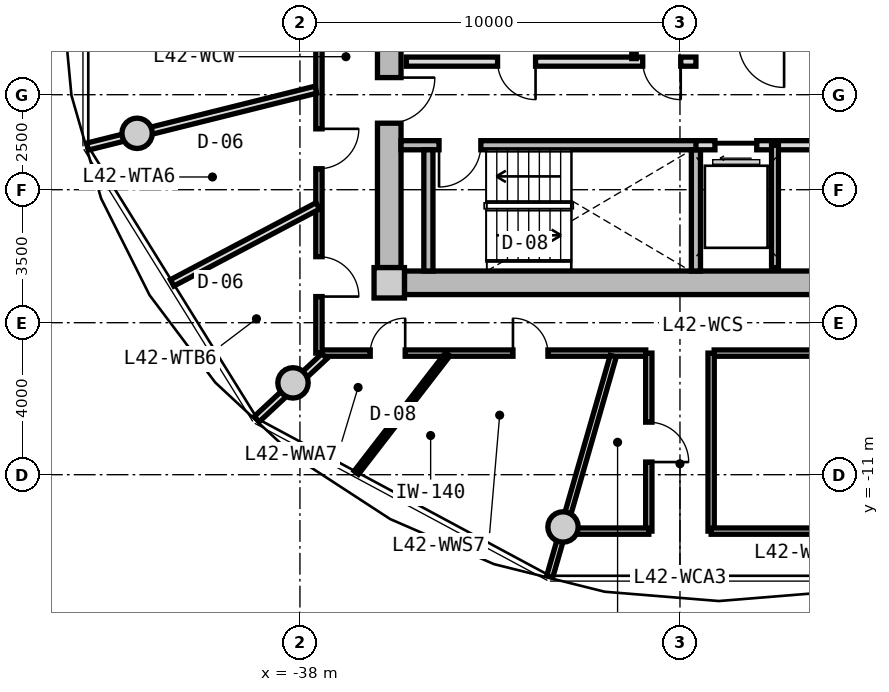
"""IFC4 building model, lengths in metres.
Left out: names, types, materials, properties, quantities, classifications, styles, units other than length and angle.
Written with IfcOpenShell. Run it as: python <this file> out.ifc"""

import sys

from ifc_helpers import new_model, si_unit, direction, frame, frame_2d, origin, origin_2d, place, context, subcontext, project, spatial, rectangle, circle, extrude, source, transform, mapped, element, fill, save


model = new_model("IFC4")
c1 = context("Model", 3, precision=1e-05, world=origin(), true_north=direction((0.0, 1.0)))
c2 = subcontext(c1, "Body", "Model", "MODEL_VIEW")
j1 = project(units=[si_unit("LENGTHUNIT", "METRE"), si_unit("PLANEANGLEUNIT", "RADIAN")], contexts=[c1])
p1 = place(None, origin())
s1 = spatial("IfcSite", under=j1, at=p1, CompositionType="ELEMENT")
p2 = place(p1, origin())
s2 = spatial("IfcBuilding", under=s1, at=p2, CompositionType="ELEMENT")
p3 = place(p2, frame((0.0, 0.0, 137.35)))
s3 = spatial("IfcBuildingStorey", under=s2, at=p3, CompositionType="ELEMENT", Elevation=137.35)
m1 = source(origin(), c2, "Body", "SweptSolid", [
    extrude(rectangle(XDim=0.8, YDim=0.8, at=origin_2d()), origin(), (0.0, 0.0, 1.0), 3.05),
])
p4 = place(p3, frame((-35.65, -5.95, 0.0), z_axis=(0.0, 0.0, 1.0), x_axis=(1.0, 0.0, 0.0)))
e1 = element("IfcColumn", 1, at=p4, inside=s3, PredefinedType="COLUMN", context=c2, shape_type="MappedRepresentation", body=[
    mapped(m1, transform((0.0, 0.0, 0.0), x_axis=(1.0, 0.0, 0.0), y_axis=(0.0, 1.0, 0.0), z_axis=(0.0, 0.0, 1.0), scale=1.0)),
])
m2 = source(origin(), c2, "Body", "SweptSolid", [
    extrude(rectangle(XDim=14.5, YDim=0.62, at=frame_2d((7.25, 0.0))), origin(), (0.0, 0.0, 1.0), 2.81),
])
p5 = place(p3, frame((-20.75, -5.95, 0.0), z_axis=(0.0, 0.0, 1.0), x_axis=(-1.0, 0.0, 0.0)))
e2 = element("IfcWall", 2, at=p5, inside=s3, PredefinedType="SHEAR", context=c2, shape_type="MappedRepresentation", body=[
    mapped(m2, transform((0.0, 0.0, 0.0), x_axis=(1.0, 0.0, 0.0), y_axis=(0.0, 1.0, 0.0), z_axis=(0.0, 0.0, 1.0), scale=1.0)),
])
m3 = source(origin(), c2, "Body", "SweptSolid", [
    extrude(rectangle(XDim=11.1, YDim=0.62, at=frame_2d((5.55, 0.0))), origin(), (0.0, 0.0, 1.0), 2.81),
])
p6 = place(p3, frame((-35.65, -5.55, 0.0), z_axis=(0.0, 0.0, 1.0), x_axis=(0.0, 1.0, 0.0)))
e3 = element("IfcWall", 3, at=p6, inside=s3, PredefinedType="SHEAR", context=c2, shape_type="MappedRepresentation", body=[
    mapped(m3, transform((0.0, 0.0, 0.0), x_axis=(1.0, 0.0, 0.0), y_axis=(0.0, 1.0, 0.0), z_axis=(0.0, 0.0, 1.0), scale=1.0)),
])
p7 = place(p6, frame((3.8, 0.0, 0.0)))
e4 = element("IfcOpeningElement", 4, at=p7, cuts=e3, PredefinedType="OPENING", context=c2, shape_type="SweptSolid", body=[
    extrude(rectangle(XDim=1.2, YDim=2.15, at=frame_2d((0.6, 1.075))), frame((0.0, 0.32, 0.0), z_axis=(0.0, -1.0, 0.0), x_axis=(1.0, 0.0, 0.0)), (0.0, 0.0, 1.0), 0.64),
])
m4 = source(origin(), c2, "Body", "SweptSolid", [
    extrude(circle(Radius=0.4, at=origin_2d()), origin(), (0.0, 0.0, 1.0), 3.05),
])
for number, where, z_axis, x_axis in (
    (5, (-42.285, -2.016, 0.0), (0.0, 0.0, 1.0), (1.0, 0.0, 0.0)),
    (6, (-38.183, -8.584, 0.0), (0.0, 0.0, 1.0), (1.0, 0.0, 0.0)),
    (7, (-31.077, -12.375, 0.0), (0.0, 0.0, 1.0), (1.0, 0.0, 0.0)),
):
    element("IfcColumn", number, at=place(p3, frame(where, z_axis=z_axis, x_axis=x_axis)), inside=s3, PredefinedType="COLUMN", context=c2, shape_type="MappedRepresentation", body=[
        mapped(m4, transform((0.0, 0.0, 0.0), x_axis=(1.0, 0.0, 0.0), y_axis=(0.0, 1.0, 0.0), z_axis=(0.0, 0.0, 1.0), scale=1.0)),
    ])
m5 = source(origin(), c2, "Body", "SweptSolid", [
    extrude(rectangle(XDim=7.88, YDim=0.24, at=frame_2d((3.94, 0.0))), origin(), (0.0, 0.0, 1.0), 2.81),
])
p8 = place(p3, frame((-35.34, -2.33, 0.0), z_axis=(0.0, 0.0, 1.0), x_axis=(1.0, 0.0, 0.0)))
e8 = element("IfcWall", 8, at=p8, inside=s3, PredefinedType="PARTITIONING", context=c2, shape_type="MappedRepresentation", body=[
    mapped(m5, transform((0.0, 0.0, 0.0), x_axis=(1.0, 0.0, 0.0), y_axis=(0.0, 1.0, 0.0), z_axis=(0.0, 0.0, 1.0), scale=1.0)),
])
p9 = place(p8, frame((1.0, 0.0, 0.0)))
e9 = element("IfcOpeningElement", 9, at=p9, cuts=e8, PredefinedType="OPENING", context=c2, shape_type="SweptSolid", body=[
    extrude(rectangle(XDim=1.1, YDim=2.15, at=frame_2d((0.55, 1.075))), frame((0.0, 0.13, 0.0), z_axis=(0.0, -1.0, 0.0), x_axis=(1.0, 0.0, 0.0)), (0.0, 0.0, 1.0), 0.26),
])
m6 = source(origin(), c2, "Body", "SweptSolid", [
    extrude(rectangle(XDim=3.19, YDim=0.24, at=frame_2d((1.595, 0.0))), origin(), (0.0, 0.0, 1.0), 2.81),
])
for number, where, z_axis, x_axis in (
    (10, (-34.62, -5.64, 0.0), (0.0, 0.0, 1.0), (0.0, 1.0, 0.0)),
    (11, (-27.58, -5.64, 0.0), (0.0, 0.0, 1.0), (0.0, 1.0, 0.0)),
):
    element("IfcWall", number, at=place(p3, frame(where, z_axis=z_axis, x_axis=x_axis)), inside=s3, PredefinedType="PARTITIONING", context=c2, shape_type="MappedRepresentation", body=[
        mapped(m6, transform((0.0, 0.0, 0.0), x_axis=(1.0, 0.0, 0.0), y_axis=(0.0, 1.0, 0.0), z_axis=(0.0, 0.0, 1.0), scale=1.0)),
    ])
m7 = source(origin(), c2, "Body", "SweptSolid", [
    extrude(rectangle(XDim=7.62, YDim=0.24, at=frame_2d((3.81, 0.0))), origin(), (0.0, 0.0, 1.0), 2.795),
])
p10 = place(p3, frame((-35.2, -0.13, 0.0), z_axis=(0.0, 0.0, 1.0), x_axis=(1.0, 0.0, 0.0)))
e12 = element("IfcWall", 12, at=p10, inside=s3, PredefinedType="PARTITIONING", context=c2, shape_type="MappedRepresentation", body=[
    mapped(m7, transform((0.0, 0.0, 0.0), x_axis=(1.0, 0.0, 0.0), y_axis=(0.0, 1.0, 0.0), z_axis=(0.0, 0.0, 1.0), scale=1.0)),
])
p11 = place(p10, frame((6.22, 0.0, 0.0)))
e13 = element("IfcOpeningElement", 13, at=p11, cuts=e12, PredefinedType="OPENING", context=c2, shape_type="SweptSolid", body=[
    extrude(rectangle(XDim=1.0, YDim=2.1, at=frame_2d((0.5, 1.05))), frame((0.0, 0.13, 0.0), z_axis=(0.0, -1.0, 0.0), x_axis=(1.0, 0.0, 0.0)), (0.0, 0.0, 1.0), 0.26),
])
p12 = place(p10, frame((2.4, 0.0, 0.0)))
e14 = element("IfcOpeningElement", 14, at=p12, cuts=e12, PredefinedType="OPENING", context=c2, shape_type="SweptSolid", body=[
    extrude(rectangle(XDim=1.0, YDim=2.1, at=frame_2d((0.5, 1.05))), frame((0.0, 0.13, 0.0), z_axis=(0.0, -1.0, 0.0), x_axis=(1.0, 0.0, 0.0)), (0.0, 0.0, 1.0), 0.26),
])
m8 = source(origin(), c2, "Body", "SweptSolid", [
    extrude(rectangle(XDim=2.33, YDim=0.115, at=frame_2d((1.165, 0.0))), origin(), (0.0, 0.0, 1.0), 2.795),
])
p13 = place(p3, frame((-29.21, -0.05, 0.0), z_axis=(0.0, 0.0, 1.0), x_axis=(0.0, 1.0, 0.0)))
e15 = element("IfcWall", 15, at=p13, inside=s3, PredefinedType="PARTITIONING", context=c2, shape_type="MappedRepresentation", body=[
    mapped(m8, transform((0.0, 0.0, 0.0), x_axis=(1.0, 0.0, 0.0), y_axis=(0.0, 1.0, 0.0), z_axis=(0.0, 0.0, 1.0), scale=1.0)),
])
m9 = source(origin(), c2, "Body", "SweptSolid", [
    extrude(rectangle(XDim=4.13, YDim=0.24, at=frame_2d((2.065, 0.0))), origin(), (0.0, 0.0, 1.0), 2.795),
])
p14 = place(p3, frame((-27.58, -2.33, 0.0), z_axis=(0.0, 0.0, 1.0), x_axis=(1.0, 0.0, 0.0)))
e16 = element("IfcWall", 16, at=p14, inside=s3, PredefinedType="PARTITIONING", context=c2, shape_type="MappedRepresentation", body=[
    mapped(m9, transform((0.0, 0.0, 0.0), x_axis=(1.0, 0.0, 0.0), y_axis=(0.0, 1.0, 0.0), z_axis=(0.0, 0.0, 1.0), scale=1.0)),
])
p15 = place(p14, frame((0.5, 0.0, 0.0)))
e17 = element("IfcOpeningElement", 17, at=p15, cuts=e16, PredefinedType="OPENING", context=c2, shape_type="SweptSolid", body=[
    extrude(rectangle(XDim=1.1, YDim=2.2, at=frame_2d((0.55, 1.1))), frame((0.0, 0.13, 0.0), z_axis=(0.0, -1.0, 0.0), x_axis=(1.0, 0.0, 0.0)), (0.0, 0.0, 1.0), 0.26),
])
m10 = source(origin(), c2, "Body", "SweptSolid", [
    extrude(rectangle(XDim=3.22, YDim=0.18, at=frame_2d((1.61, 0.0))), origin(), (0.0, 0.0, 1.0), 2.795),
])
p16 = place(p3, frame((-25.5, -5.55, 0.0), z_axis=(0.0, 0.0, 1.0), x_axis=(0.0, 1.0, 0.0)))
e18 = element("IfcWall", 18, at=p16, inside=s3, PredefinedType="PARTITIONING", context=c2, shape_type="MappedRepresentation", body=[
    mapped(m10, transform((0.0, 0.0, 0.0), x_axis=(1.0, 0.0, 0.0), y_axis=(0.0, 1.0, 0.0), z_axis=(0.0, 0.0, 1.0), scale=1.0)),
])
m11 = source(origin(), c2, "Body", "SweptSolid", [
    extrude(rectangle(XDim=8.6, YDim=0.165, at=frame_2d((4.3, 0.0))), origin(), (0.0, 0.0, 1.0), 2.795),
])
p17 = place(p3, frame((-18.5, -7.8, 0.0), z_axis=(0.0, 0.0, 1.0), x_axis=(-1.0, 0.0, 0.0)))
e19 = element("IfcWall", 19, at=p17, inside=s3, PredefinedType="PARTITIONING", context=c2, shape_type="MappedRepresentation", body=[
    mapped(m11, transform((0.0, 0.0, 0.0), x_axis=(1.0, 0.0, 0.0), y_axis=(0.0, 1.0, 0.0), z_axis=(0.0, 0.0, 1.0), scale=1.0)),
])
p18 = place(p17, frame((3.775, 0.0, 0.0)))
e20 = element("IfcOpeningElement", 20, at=p18, cuts=e19, PredefinedType="OPENING", context=c2, shape_type="SweptSolid", body=[
    extrude(rectangle(XDim=1.05, YDim=2.15, at=frame_2d((0.525, 1.075))), frame((0.0, 0.093, 0.0), z_axis=(0.0, -1.0, 0.0), x_axis=(1.0, 0.0, 0.0)), (0.0, 0.0, 1.0), 0.185),
])
p19 = place(p3, frame((-28.9, -7.8, 0.0), z_axis=(0.0, 0.0, 1.0), x_axis=(-1.0, 0.0, 0.0)))
e21 = element("IfcWall", 21, at=p19, inside=s3, PredefinedType="PARTITIONING", context=c2, shape_type="MappedRepresentation", body=[
    mapped(m11, transform((0.0, 0.0, 0.0), x_axis=(1.0, 0.0, 0.0), y_axis=(0.0, 1.0, 0.0), z_axis=(0.0, 0.0, 1.0), scale=1.0)),
])
p20 = place(p19, frame((6.33, 0.0, 0.0)))
e22 = element("IfcOpeningElement", 22, at=p20, cuts=e21, PredefinedType="OPENING", context=c2, shape_type="SweptSolid", body=[
    extrude(rectangle(XDim=0.92, YDim=2.1, at=frame_2d((0.46, 1.05))), frame((0.0, 0.093, 0.0), z_axis=(0.0, -1.0, 0.0), x_axis=(1.0, 0.0, 0.0)), (0.0, 0.0, 1.0), 0.185),
])
p21 = place(p19, frame((2.575, 0.0, 0.0)))
e23 = element("IfcOpeningElement", 23, at=p21, cuts=e21, PredefinedType="OPENING", context=c2, shape_type="SweptSolid", body=[
    extrude(rectangle(XDim=0.92, YDim=2.1, at=frame_2d((0.46, 1.05))), frame((0.0, 0.093, 0.0), z_axis=(0.0, -1.0, 0.0), x_axis=(1.0, 0.0, 0.0)), (0.0, 0.0, 1.0), 0.185),
])
m12 = source(origin(), c2, "Body", "SweptSolid", [
    extrude(rectangle(XDim=15.6, YDim=0.165, at=frame_2d((7.8, 0.0))), origin(), (0.0, 0.0, 1.0), 2.795),
])
p22 = place(p3, frame((-37.5, -7.8, 0.0), z_axis=(0.0, 0.0, 1.0), x_axis=(0.0, 1.0, 0.0)))
e24 = element("IfcWall", 24, at=p22, inside=s3, PredefinedType="PARTITIONING", context=c2, shape_type="MappedRepresentation", body=[
    mapped(m12, transform((0.0, 0.0, 0.0), x_axis=(1.0, 0.0, 0.0), y_axis=(0.0, 1.0, 0.0), z_axis=(0.0, 0.0, 1.0), scale=1.0)),
])
p23 = place(p22, frame((8.95, 0.0, 0.0)))
e25 = element("IfcOpeningElement", 25, at=p23, cuts=e24, PredefinedType="OPENING", context=c2, shape_type="SweptSolid", body=[
    extrude(rectangle(XDim=1.25, YDim=2.2, at=frame_2d((0.625, 1.1))), frame((0.0, 0.093, 0.0), z_axis=(0.0, -1.0, 0.0), x_axis=(1.0, 0.0, 0.0)), (0.0, 0.0, 1.0), 0.185),
])
p24 = place(p22, frame((4.851, 0.0, 0.0)))
e26 = element("IfcOpeningElement", 26, at=p24, cuts=e24, PredefinedType="OPENING", context=c2, shape_type="SweptSolid", body=[
    extrude(rectangle(XDim=1.05, YDim=2.15, at=frame_2d((0.525, 1.075))), frame((0.0, 0.093, 0.0), z_axis=(0.0, -1.0, 0.0), x_axis=(1.0, 0.0, 0.0)), (0.0, 0.0, 1.0), 0.185),
])
p25 = place(p22, frame((1.488, 0.0, 0.0)))
e27 = element("IfcOpeningElement", 27, at=p25, cuts=e24, PredefinedType="OPENING", context=c2, shape_type="SweptSolid", body=[
    extrude(rectangle(XDim=1.05, YDim=2.15, at=frame_2d((0.525, 1.075))), frame((0.0, 0.093, 0.0), z_axis=(0.0, -1.0, 0.0), x_axis=(1.0, 0.0, 0.0)), (0.0, 0.0, 1.0), 0.185),
])
m13 = source(origin(), c2, "Body", "SweptSolid", [
    extrude(rectangle(XDim=6.035, YDim=0.165, at=frame_2d((3.018, 0.0))), origin(), (0.0, 0.0, 1.0), 2.345),
])
p26 = place(p3, frame((-29.756, -7.88, 0.0), z_axis=(0.0, 0.0, 1.0), x_axis=(-0.276809454862, -0.960924828329, 0.0)))
e28 = element("IfcWall", 28, at=p26, inside=s3, PredefinedType="PARTITIONING", context=c2, shape_type="MappedRepresentation", body=[
    mapped(m13, transform((0.0, 0.0, 0.0), x_axis=(1.0, 0.0, 0.0), y_axis=(0.0, 1.0, 0.0), z_axis=(0.0, 0.0, 1.0), scale=1.0)),
])
m14 = source(origin(), c2, "Body", "SweptSolid", [
    extrude(rectangle(XDim=4.685, YDim=0.165, at=frame_2d((2.342, 0.0))), origin(), (0.0, 0.0, 1.0), 2.795),
])
p27 = place(p3, frame((-28.82, -12.485, 0.0), z_axis=(0.0, 0.0, 1.0), x_axis=(0.0, 1.0, 0.0)))
e29 = element("IfcWall", 29, at=p27, inside=s3, PredefinedType="PARTITIONING", context=c2, shape_type="MappedRepresentation", body=[
    mapped(m14, transform((0.0, 0.0, 0.0), x_axis=(1.0, 0.0, 0.0), y_axis=(0.0, 1.0, 0.0), z_axis=(0.0, 0.0, 1.0), scale=1.0)),
])
p28 = place(p27, frame((1.817, 0.0, 0.0)))
e30 = element("IfcOpeningElement", 30, at=p28, cuts=e29, PredefinedType="OPENING", context=c2, shape_type="SweptSolid", body=[
    extrude(rectangle(XDim=1.05, YDim=2.15, at=frame_2d((0.525, 1.075))), frame((0.0, 0.093, 0.0), z_axis=(0.0, -1.0, 0.0), x_axis=(1.0, 0.0, 0.0)), (0.0, 0.0, 1.0), 0.185),
])
m15 = source(origin(), c2, "Body", "SweptSolid", [
    extrude(rectangle(XDim=2.419, YDim=0.165, at=frame_2d((1.209, 0.0))), origin(), (0.0, 0.0, 1.0), 2.345),
])
p29 = place(p3, frame((-31.239, -12.485, 0.0), z_axis=(0.0, 0.0, 1.0), x_axis=(1.0, 0.0, 0.0)))
e31 = element("IfcWall", 31, at=p29, inside=s3, PredefinedType="PARTITIONING", context=c2, shape_type="MappedRepresentation", body=[
    mapped(m15, transform((0.0, 0.0, 0.0), x_axis=(1.0, 0.0, 0.0), y_axis=(0.0, 1.0, 0.0), z_axis=(0.0, 0.0, 1.0), scale=1.0)),
])
p30 = place(p3, frame((-27.18, -12.485, 0.0), z_axis=(0.0, 0.0, 1.0), x_axis=(0.0, 1.0, 0.0)))
e32 = element("IfcWall", 32, at=p30, inside=s3, PredefinedType="PARTITIONING", context=c2, shape_type="MappedRepresentation", body=[
    mapped(m14, transform((0.0, 0.0, 0.0), x_axis=(1.0, 0.0, 0.0), y_axis=(0.0, 1.0, 0.0), z_axis=(0.0, 0.0, 1.0), scale=1.0)),
])
m16 = source(origin(), c2, "Body", "SweptSolid", [
    extrude(rectangle(XDim=7.139, YDim=0.165, at=frame_2d((3.569, 0.0))), origin(), (0.0, 0.0, 1.0), 2.345),
])
p31 = place(p3, frame((-27.18, -12.485, 0.0), z_axis=(0.0, 0.0, 1.0), x_axis=(1.0, 0.0, 0.0)))
e33 = element("IfcWall", 33, at=p31, inside=s3, PredefinedType="PARTITIONING", context=c2, shape_type="MappedRepresentation", body=[
    mapped(m16, transform((0.0, 0.0, 0.0), x_axis=(1.0, 0.0, 0.0), y_axis=(0.0, 1.0, 0.0), z_axis=(0.0, 0.0, 1.0), scale=1.0)),
])
m17 = source(origin(), c2, "Body", "SweptSolid", [
    extrude(rectangle(XDim=6.193, YDim=0.19, at=frame_2d((3.096, 0.0))), origin(), (0.0, 0.0, 1.0), 2.345),
])
p32 = place(p3, frame((-37.58, -0.868, 0.0), z_axis=(0.0, 0.0, 1.0), x_axis=(-0.970309243466, -0.241867674657, 0.0)))
e34 = element("IfcWall", 34, at=p32, inside=s3, PredefinedType="PARTITIONING", context=c2, shape_type="MappedRepresentation", body=[
    mapped(m17, transform((0.0, 0.0, 0.0), x_axis=(1.0, 0.0, 0.0), y_axis=(0.0, 1.0, 0.0), z_axis=(0.0, 0.0, 1.0), scale=1.0)),
])
m18 = source(origin(), c2, "Body", "SweptSolid", [
    extrude(rectangle(XDim=2.435, YDim=0.19, at=frame_2d((1.217, 0.0))), origin(), (0.0, 0.0, 1.0), 2.345),
])
p33 = place(p3, frame((-37.354, -7.88, 0.0), z_axis=(0.0, 0.0, 1.0), x_axis=(-0.732164643118, -0.681127693878, 0.0)))
e35 = element("IfcWall", 35, at=p33, inside=s3, PredefinedType="PARTITIONING", context=c2, shape_type="MappedRepresentation", body=[
    mapped(m18, transform((0.0, 0.0, 0.0), x_axis=(1.0, 0.0, 0.0), y_axis=(0.0, 1.0, 0.0), z_axis=(0.0, 0.0, 1.0), scale=1.0)),
])
m19 = source(origin(), c2, "Body", "SweptSolid", [
    extrude(rectangle(XDim=4.335, YDim=0.19, at=frame_2d((2.168, 0.0))), origin(), (0.0, 0.0, 1.0), 2.795),
])
p34 = place(p3, frame((-37.53, -3.926, 0.0), z_axis=(0.0, 0.0, 1.0), x_axis=(-0.884108234352, -0.4672821738, 0.0)))
e36 = element("IfcWall", 36, at=p34, inside=s3, PredefinedType="PARTITIONING", context=c2, shape_type="MappedRepresentation", body=[
    mapped(m19, transform((0.0, 0.0, 0.0), x_axis=(1.0, 0.0, 0.0), y_axis=(0.0, 1.0, 0.0), z_axis=(0.0, 0.0, 1.0), scale=1.0)),
])
m20 = source(origin(), c2, "Body", "SweptSolid", [
    extrude(rectangle(XDim=3.937, YDim=0.14, at=frame_2d((1.968, 0.0))), origin(), (0.0, 0.0, 1.0), 2.795),
])
p35 = place(p3, frame((-34.11, -7.83, 0.0), z_axis=(0.0, 0.0, 1.0), x_axis=(-0.611016723561, -0.791617687731, 0.0)))
e37 = element("IfcWall", 37, at=p35, inside=s3, PredefinedType="PARTITIONING", context=c2, shape_type="MappedRepresentation", body=[
    mapped(m20, transform((0.0, 0.0, 0.0), x_axis=(1.0, 0.0, 0.0), y_axis=(0.0, 1.0, 0.0), z_axis=(0.0, 0.0, 1.0), scale=1.0)),
])
m21 = source(origin(), c2, "Body", "SweptSolid", [
    extrude(rectangle(XDim=1.1, YDim=2.15, at=frame_2d((0.55, 1.075))), frame((0.0, 0.025, 0.0), z_axis=(0.0, -1.0, 0.0), x_axis=(1.0, 0.0, 0.0)), (0.0, 0.0, 1.0), 0.05),
])
p36 = place(p9, frame((1.1, 0.0, 0.0), z_axis=(0.0, 0.0, 1.0), x_axis=(-1.0, 0.0, 0.0)))
e38 = element("IfcDoor", 38, at=p36, inside=s3, OperationType="SINGLE_SWING_RIGHT", PredefinedType="DOOR", context=c2, shape_type="MappedRepresentation", body=[
    mapped(m21, transform((0.0, 0.0, 0.0), x_axis=(1.0, 0.0, 0.0), y_axis=(0.0, 1.0, 0.0), z_axis=(0.0, 0.0, 1.0), scale=1.0)),
])
fill(e9, e38)
m22 = source(origin(), c2, "Body", "SweptSolid", [
    extrude(rectangle(XDim=1.2, YDim=2.15, at=frame_2d((0.6, 1.075))), frame((0.0, 0.025, 0.0), z_axis=(0.0, -1.0, 0.0), x_axis=(1.0, 0.0, 0.0)), (0.0, 0.0, 1.0), 0.05),
])
p37 = place(p7, frame((1.2, 0.0, 0.0), z_axis=(0.0, 0.0, 1.0), x_axis=(-1.0, 0.0, 0.0)))
e39 = element("IfcDoor", 39, at=p37, inside=s3, OperationType="SINGLE_SWING_LEFT", PredefinedType="DOOR", context=c2, shape_type="MappedRepresentation", body=[
    mapped(m22, transform((0.0, 0.0, 0.0), x_axis=(1.0, 0.0, 0.0), y_axis=(0.0, 1.0, 0.0), z_axis=(0.0, 0.0, 1.0), scale=1.0)),
])
fill(e4, e39)
m23 = source(origin(), c2, "Body", "SweptSolid", [
    extrude(rectangle(XDim=1.0, YDim=2.1, at=frame_2d((0.5, 1.05))), frame((0.0, 0.025, 0.0), z_axis=(0.0, -1.0, 0.0), x_axis=(1.0, 0.0, 0.0)), (0.0, 0.0, 1.0), 0.05),
])
p38 = place(p11, frame((1.0, 0.0, 0.0), z_axis=(0.0, 0.0, 1.0), x_axis=(-1.0, 0.0, 0.0)))
e40 = element("IfcDoor", 40, at=p38, inside=s3, OperationType="SINGLE_SWING_LEFT", PredefinedType="DOOR", context=c2, shape_type="MappedRepresentation", body=[
    mapped(m23, transform((0.0, 0.0, 0.0), x_axis=(1.0, 0.0, 0.0), y_axis=(0.0, 1.0, 0.0), z_axis=(0.0, 0.0, 1.0), scale=1.0)),
])
fill(e13, e40)
p39 = place(p12, frame((1.0, 0.0, 0.0), z_axis=(0.0, 0.0, 1.0), x_axis=(-1.0, 0.0, 0.0)))
e41 = element("IfcDoor", 41, at=p39, inside=s3, OperationType="SINGLE_SWING_LEFT", PredefinedType="DOOR", context=c2, shape_type="MappedRepresentation", body=[
    mapped(m23, transform((0.0, 0.0, 0.0), x_axis=(1.0, 0.0, 0.0), y_axis=(0.0, 1.0, 0.0), z_axis=(0.0, 0.0, 1.0), scale=1.0)),
])
fill(e14, e41)
m24 = source(origin(), c2, "Body", "SweptSolid", [
    extrude(rectangle(XDim=1.1, YDim=2.2, at=frame_2d((0.55, 1.1))), frame((0.0, 0.025, 0.0), z_axis=(0.0, -1.0, 0.0), x_axis=(1.0, 0.0, 0.0)), (0.0, 0.0, 1.0), 0.05),
])
p40 = place(p15, frame((1.1, 0.0, 0.0), z_axis=(0.0, 0.0, 1.0), x_axis=(-1.0, 0.0, 0.0)))
e42 = element("IfcDoor", 42, at=p40, inside=s3, OperationType="SLIDING_TO_LEFT", PredefinedType="DOOR", context=c2, shape_type="MappedRepresentation", body=[
    mapped(m24, transform((0.0, 0.0, 0.0), x_axis=(1.0, 0.0, 0.0), y_axis=(0.0, 1.0, 0.0), z_axis=(0.0, 0.0, 1.0), scale=1.0)),
])
fill(e17, e42)
m25 = source(origin(), c2, "Body", "SweptSolid", [
    extrude(rectangle(XDim=1.05, YDim=2.15, at=frame_2d((0.525, 1.075))), frame((0.0, 0.025, 0.0), z_axis=(0.0, -1.0, 0.0), x_axis=(1.0, 0.0, 0.0)), (0.0, 0.0, 1.0), 0.05),
])
p41 = place(p28, frame((1.05, 0.0, 0.0), z_axis=(0.0, 0.0, 1.0), x_axis=(-1.0, 0.0, 0.0)))
e43 = element("IfcDoor", 43, at=p41, inside=s3, OperationType="SINGLE_SWING_RIGHT", PredefinedType="DOOR", context=c2, shape_type="MappedRepresentation", body=[
    mapped(m25, transform((0.0, 0.0, 0.0), x_axis=(1.0, 0.0, 0.0), y_axis=(0.0, 1.0, 0.0), z_axis=(0.0, 0.0, 1.0), scale=1.0)),
])
fill(e30, e43)
p42 = place(p24, frame((1.05, 0.0, 0.0), z_axis=(0.0, 0.0, 1.0), x_axis=(-1.0, 0.0, 0.0)))
e44 = element("IfcDoor", 44, at=p42, inside=s3, OperationType="SINGLE_SWING_LEFT", PredefinedType="DOOR", context=c2, shape_type="MappedRepresentation", body=[
    mapped(m25, transform((0.0, 0.0, 0.0), x_axis=(1.0, 0.0, 0.0), y_axis=(0.0, 1.0, 0.0), z_axis=(0.0, 0.0, 1.0), scale=1.0)),
])
fill(e26, e44)
p43 = place(p25, frame((1.05, 0.0, 0.0), z_axis=(0.0, 0.0, 1.0), x_axis=(-1.0, 0.0, 0.0)))
e45 = element("IfcDoor", 45, at=p43, inside=s3, OperationType="SINGLE_SWING_RIGHT", PredefinedType="DOOR", context=c2, shape_type="MappedRepresentation", body=[
    mapped(m25, transform((0.0, 0.0, 0.0), x_axis=(1.0, 0.0, 0.0), y_axis=(0.0, 1.0, 0.0), z_axis=(0.0, 0.0, 1.0), scale=1.0)),
])
fill(e27, e45)
m26 = source(origin(), c2, "Body", "SweptSolid", [
    extrude(rectangle(XDim=0.92, YDim=2.1, at=frame_2d((0.46, 1.05))), frame((0.0, 0.025, 0.0), z_axis=(0.0, -1.0, 0.0), x_axis=(1.0, 0.0, 0.0)), (0.0, 0.0, 1.0), 0.05),
])
p44 = place(p20, frame((0.92, 0.0, 0.0), z_axis=(0.0, 0.0, 1.0), x_axis=(-1.0, 0.0, 0.0)))
e46 = element("IfcDoor", 46, at=p44, inside=s3, OperationType="SINGLE_SWING_RIGHT", PredefinedType="DOOR", context=c2, shape_type="MappedRepresentation", body=[
    mapped(m26, transform((0.0, 0.0, 0.0), x_axis=(1.0, 0.0, 0.0), y_axis=(0.0, 1.0, 0.0), z_axis=(0.0, 0.0, 1.0), scale=1.0)),
])
fill(e22, e46)
p45 = place(p21, frame((0.92, 0.0, 0.0), z_axis=(0.0, 0.0, 1.0), x_axis=(-1.0, 0.0, 0.0)))
e47 = element("IfcDoor", 47, at=p45, inside=s3, OperationType="SINGLE_SWING_LEFT", PredefinedType="DOOR", context=c2, shape_type="MappedRepresentation", body=[
    mapped(m26, transform((0.0, 0.0, 0.0), x_axis=(1.0, 0.0, 0.0), y_axis=(0.0, 1.0, 0.0), z_axis=(0.0, 0.0, 1.0), scale=1.0)),
])
fill(e23, e47)
save(model, sys.argv[1])
